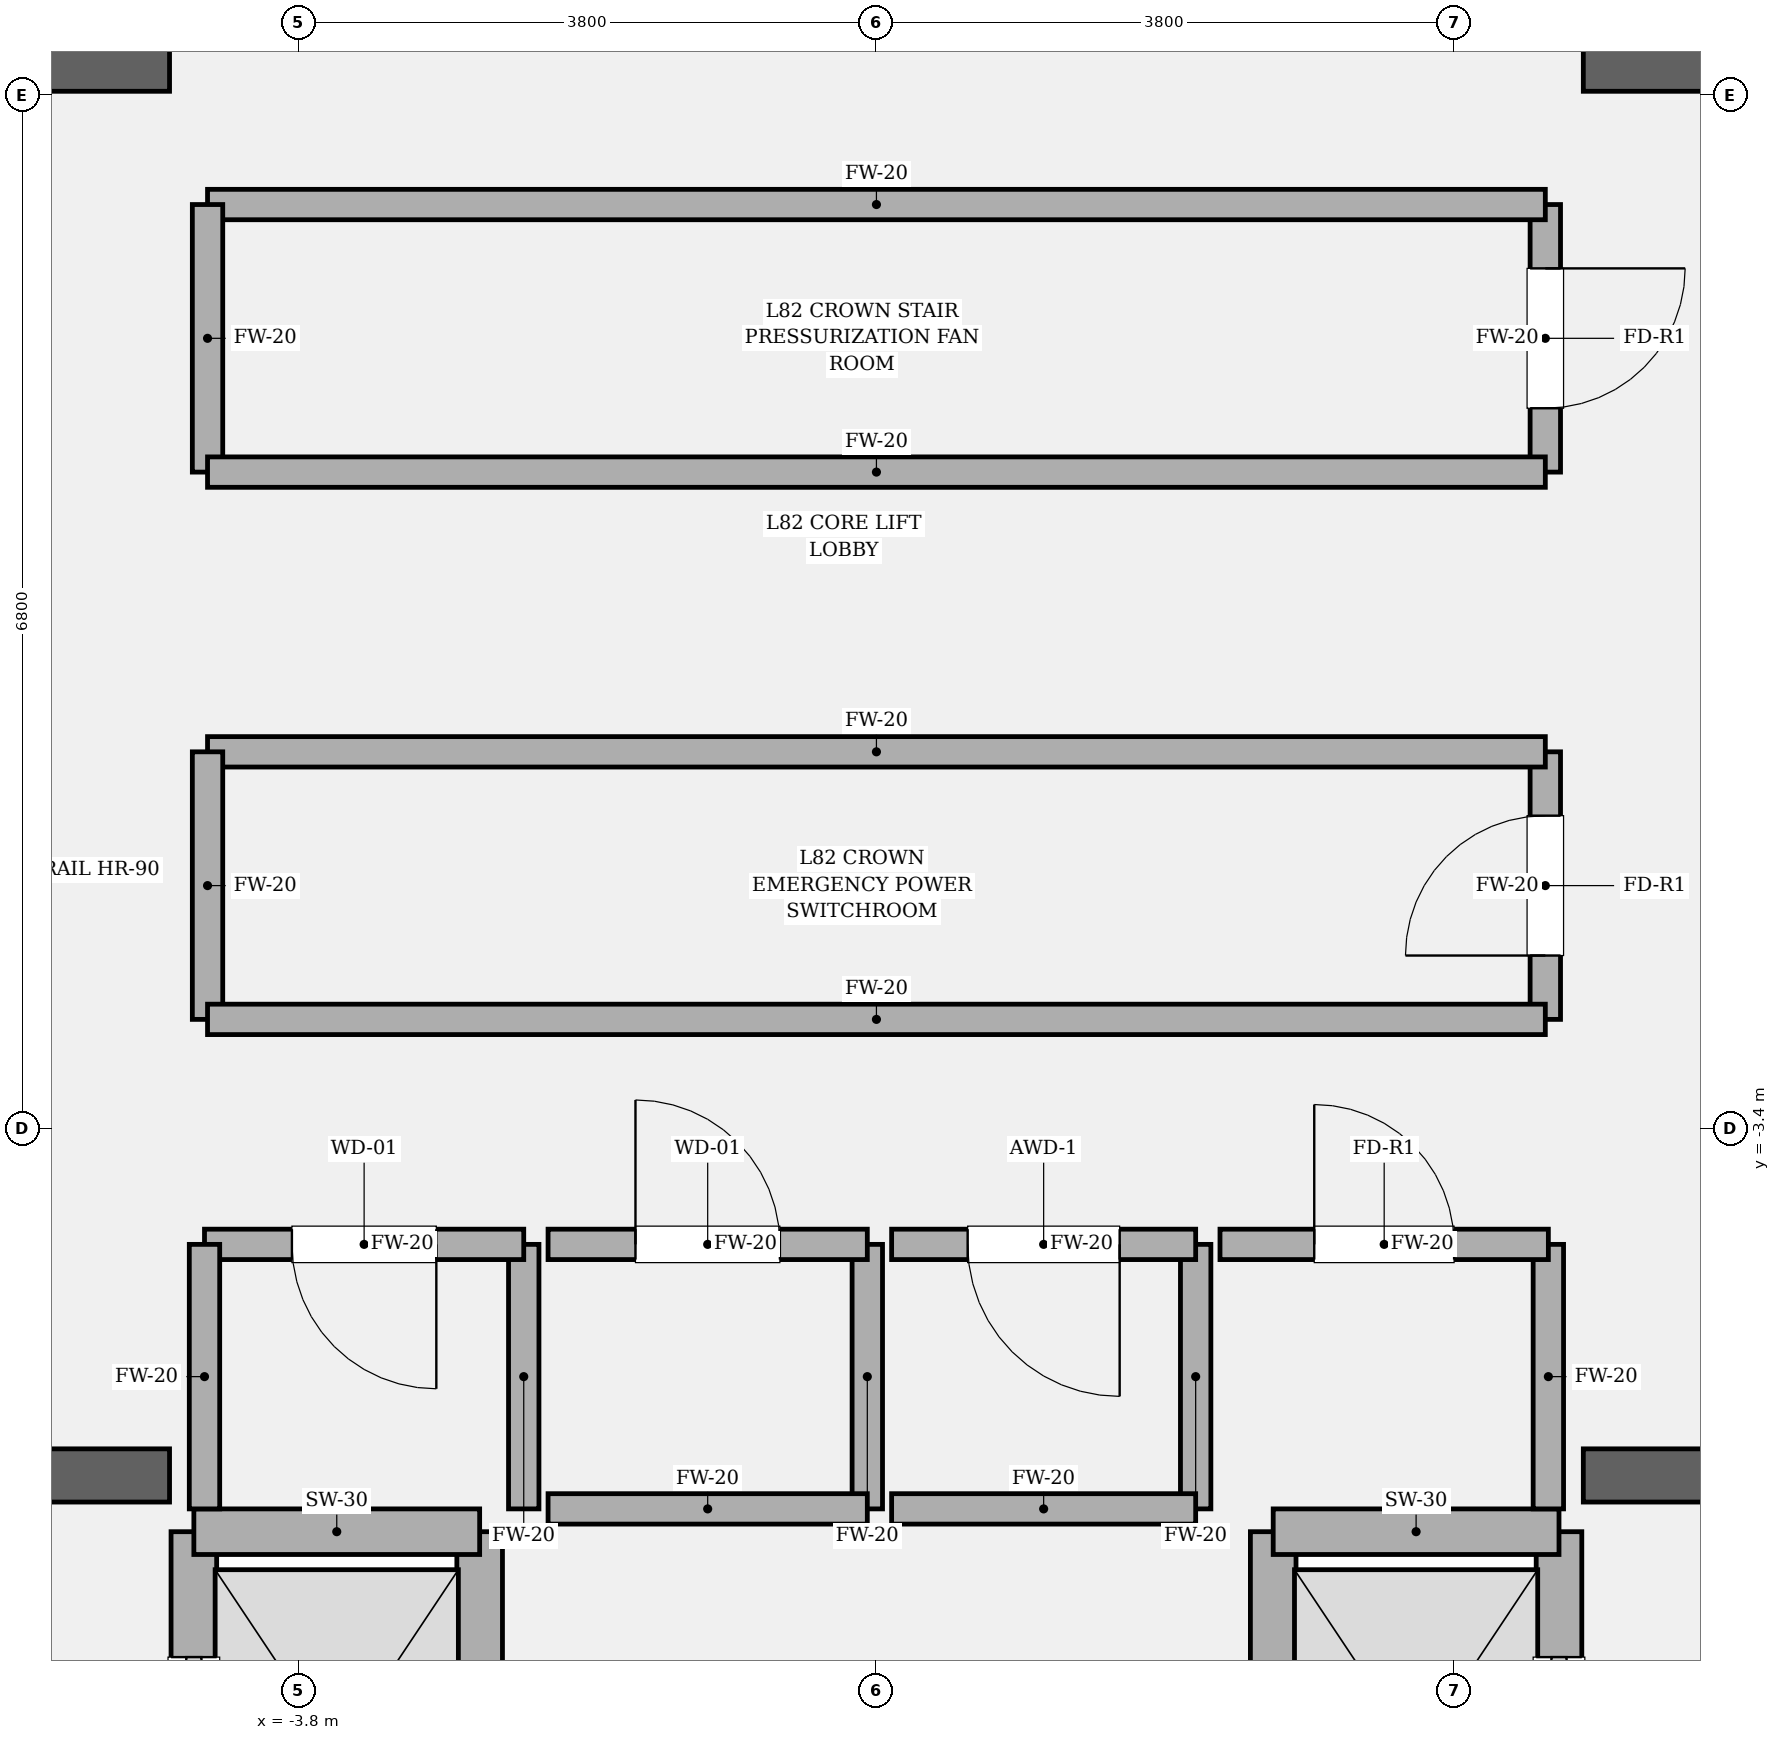
"""IFC4 building model, lengths in metres.
Left out: names, types, materials, properties, quantities, classifications, styles, units other than length and angle.
Written with IfcOpenShell. Run it as: python <this file> out.ifc"""

import sys

from ifc_helpers import new_model, si_unit, direction, frame, frame_2d, origin, place, context, subcontext, project, spatial, rectangle, extrude, element, fill, save


model = new_model("IFC4")
c1 = context("Model", 3, precision=1e-05, world=origin(), true_north=direction((0.0, 1.0)))
c2 = subcontext(c1, "Body", "Model", "MODEL_VIEW")
j1 = project(units=[si_unit("LENGTHUNIT", "METRE"), si_unit("PLANEANGLEUNIT", "RADIAN")], contexts=[c1])
p1 = place(None, origin())
s1 = spatial("IfcSite", under=j1, at=p1, CompositionType="ELEMENT")
p2 = place(p1, origin())
s2 = spatial("IfcBuilding", under=s1, at=p2, CompositionType="ELEMENT")
p3 = place(p2, frame((0.0, 0.0, 348.3)))
s3 = spatial("IfcBuildingStorey", under=s2, at=p3, CompositionType="ELEMENT", Elevation=348.3)
p4 = place(p3, frame((-9.975, -5.68, 0.0), z_axis=(0.0, 0.0, 1.0), x_axis=(1.0, 0.0, 0.0)))
e1 = element("IfcWall", 1, at=p4, inside=s3, PredefinedType="SOLIDWALL", context=c2, shape_type="SweptSolid", body=[
    extrude(rectangle(XDim=5.325, YDim=0.35, at=frame_2d((2.663, 0.0))), origin(), (0.0, 0.0, 1.0), 4.5),
])
p5 = place(p4, frame((1.435, 0.0, 0.0)))
e2 = element("IfcOpeningElement", 2, at=p5, cuts=e1, PredefinedType="OPENING", context=c2, shape_type="SweptSolid", body=[
    extrude(rectangle(XDim=1.18, YDim=2.2, at=frame_2d((0.59, 1.1))), frame((0.0, 0.185, 0.0), z_axis=(0.0, -1.0, 0.0), x_axis=(1.0, 0.0, 0.0)), (0.0, 0.0, 1.0), 0.37),
])
p6 = place(p3, frame((4.65, -5.68, 0.0), z_axis=(0.0, 0.0, 1.0), x_axis=(1.0, 0.0, 0.0)))
e3 = element("IfcWall", 3, at=p6, inside=s3, PredefinedType="SOLIDWALL", context=c2, shape_type="SweptSolid", body=[
    extrude(rectangle(XDim=5.325, YDim=0.35, at=frame_2d((2.663, 0.0))), origin(), (0.0, 0.0, 1.0), 4.5),
])
p7 = place(p6, frame((2.71, 0.0, 0.0)))
e4 = element("IfcOpeningElement", 4, at=p7, cuts=e3, PredefinedType="OPENING", context=c2, shape_type="SweptSolid", body=[
    extrude(rectangle(XDim=1.18, YDim=2.2, at=frame_2d((0.59, 1.1))), frame((0.0, 0.185, 0.0), z_axis=(0.0, -1.0, 0.0), x_axis=(1.0, 0.0, 0.0)), (0.0, 0.0, 1.0), 0.37),
])
for number, where, z_axis, x_axis in (
    (5, (-9.975, 3.6, 0.0), (0.0, 0.0, 1.0), (1.0, 0.0, 0.0)),
    (6, (4.65, 3.6, 0.0), (0.0, 0.0, 1.0), (1.0, 0.0, 0.0)),
):
    element("IfcWall", number, at=place(p3, frame(where, z_axis=z_axis, x_axis=x_axis)), inside=s3, PredefinedType="SOLIDWALL", context=c2, shape_type="SweptSolid", body=[
        extrude(rectangle(XDim=5.325, YDim=0.35, at=frame_2d((2.663, 0.0))), origin(), (0.0, 0.0, 1.0), 4.5),
    ])
p8 = place(p3, frame((-4.49, -8.82, 0.0), z_axis=(0.0, 0.0, 1.0), x_axis=(0.0, 1.0, 0.0)))
e7 = element("IfcWall", 7, at=p8, inside=s3, PredefinedType="SOLIDWALL", context=c2, shape_type="SweptSolid", body=[
    extrude(rectangle(XDim=2.77, YDim=0.3, at=frame_2d((1.385, 0.0))), origin(), (0.0, 0.0, 1.0), 4.22),
])
p9 = place(p8, frame((0.825, 0.0, 0.0)))
e8 = element("IfcOpeningElement", 8, at=p9, cuts=e7, PredefinedType="OPENING", context=c2, shape_type="SweptSolid", body=[
    extrude(rectangle(XDim=1.12, YDim=2.25, at=frame_2d((0.56, 1.125))), frame((0.0, 0.16, 0.0), z_axis=(0.0, -1.0, 0.0), x_axis=(1.0, 0.0, 0.0)), (0.0, 0.0, 1.0), 0.32),
])
p10 = place(p3, frame((-2.61, -8.82, 0.0), z_axis=(0.0, 0.0, 1.0), x_axis=(0.0, 1.0, 0.0)))
e9 = element("IfcWall", 9, at=p10, inside=s3, PredefinedType="SOLIDWALL", context=c2, shape_type="SweptSolid", body=[
    extrude(rectangle(XDim=2.77, YDim=0.3, at=frame_2d((1.385, 0.0))), origin(), (0.0, 0.0, 1.0), 4.22),
])
p11 = place(p3, frame((-4.49, -6.05, 0.0), z_axis=(0.0, 0.0, 1.0), x_axis=(1.0, 0.0, 0.0)))
e10 = element("IfcWall", 10, at=p11, inside=s3, PredefinedType="SOLIDWALL", context=c2, shape_type="SweptSolid", body=[
    extrude(rectangle(XDim=1.88, YDim=0.3, at=frame_2d((0.94, 0.0))), origin(), (0.0, 0.0, 1.0), 4.22),
])
p12 = place(p3, frame((4.49, -8.82, 0.0), z_axis=(0.0, 0.0, 1.0), x_axis=(0.0, 1.0, 0.0)))
e11 = element("IfcWall", 11, at=p12, inside=s3, PredefinedType="SOLIDWALL", context=c2, shape_type="SweptSolid", body=[
    extrude(rectangle(XDim=2.77, YDim=0.3, at=frame_2d((1.385, 0.0))), origin(), (0.0, 0.0, 1.0), 4.22),
])
p13 = place(p12, frame((0.825, 0.0, 0.0)))
e12 = element("IfcOpeningElement", 12, at=p13, cuts=e11, PredefinedType="OPENING", context=c2, shape_type="SweptSolid", body=[
    extrude(rectangle(XDim=1.12, YDim=2.25, at=frame_2d((0.56, 1.125))), frame((0.0, 0.16, 0.0), z_axis=(0.0, -1.0, 0.0), x_axis=(1.0, 0.0, 0.0)), (0.0, 0.0, 1.0), 0.32),
])
p14 = place(p3, frame((2.61, -8.82, 0.0), z_axis=(0.0, 0.0, 1.0), x_axis=(0.0, 1.0, 0.0)))
e13 = element("IfcWall", 13, at=p14, inside=s3, PredefinedType="SOLIDWALL", context=c2, shape_type="SweptSolid", body=[
    extrude(rectangle(XDim=2.77, YDim=0.3, at=frame_2d((1.385, 0.0))), origin(), (0.0, 0.0, 1.0), 4.22),
])
p15 = place(p3, frame((2.61, -6.05, 0.0), z_axis=(0.0, 0.0, 1.0), x_axis=(1.0, 0.0, 0.0)))
e14 = element("IfcWall", 14, at=p15, inside=s3, PredefinedType="SOLIDWALL", context=c2, shape_type="SweptSolid", body=[
    extrude(rectangle(XDim=1.88, YDim=0.3, at=frame_2d((0.94, 0.0))), origin(), (0.0, 0.0, 1.0), 4.22),
])
p16 = place(p3, frame((-2.32, -5.9, 0.0), z_axis=(0.0, 0.0, 1.0), x_axis=(0.0, 1.0, 0.0)))
e15 = element("IfcWall", 15, at=p16, inside=s3, PredefinedType="SOLIDWALL", context=c2, shape_type="SweptSolid", body=[
    extrude(rectangle(XDim=1.74, YDim=0.2, at=frame_2d((0.87, 0.0))), origin(), (0.0, 0.0, 1.0), 4.22),
])
p17 = place(p3, frame((-2.32, -4.16, 0.0), z_axis=(0.0, 0.0, 1.0), x_axis=(-1.0, 0.0, 0.0)))
e16 = element("IfcWall", 16, at=p17, inside=s3, PredefinedType="SOLIDWALL", context=c2, shape_type="SweptSolid", body=[
    extrude(rectangle(XDim=2.1, YDim=0.2, at=frame_2d((1.05, 0.0))), origin(), (0.0, 0.0, 1.0), 4.22),
])
p18 = place(p17, frame((0.575, 0.0, 0.0)))
e17 = element("IfcOpeningElement", 17, at=p18, cuts=e16, PredefinedType="OPENING", context=c2, shape_type="SweptSolid", body=[
    extrude(rectangle(XDim=0.95, YDim=2.15, at=frame_2d((0.475, 1.075))), frame((0.0, 0.11, 0.0), z_axis=(0.0, -1.0, 0.0), x_axis=(1.0, 0.0, 0.0)), (0.0, 0.0, 1.0), 0.22),
])
for number, where, z_axis, x_axis in (
    (18, (-4.42, -4.16, 0.0), (0.0, 0.0, 1.0), (0.0, -1.0, 0.0)),
    (19, (-0.06, -5.9, 0.0), (0.0, 0.0, 1.0), (0.0, 1.0, 0.0)),
):
    element("IfcWall", number, at=place(p3, frame(where, z_axis=z_axis, x_axis=x_axis)), inside=s3, PredefinedType="SOLIDWALL", context=c2, shape_type="SweptSolid", body=[
        extrude(rectangle(XDim=1.74, YDim=0.2, at=frame_2d((0.87, 0.0))), origin(), (0.0, 0.0, 1.0), 4.22),
    ])
p19 = place(p3, frame((-0.06, -4.16, 0.0), z_axis=(0.0, 0.0, 1.0), x_axis=(-1.0, 0.0, 0.0)))
e20 = element("IfcWall", 20, at=p19, inside=s3, PredefinedType="SOLIDWALL", context=c2, shape_type="SweptSolid", body=[
    extrude(rectangle(XDim=2.1, YDim=0.2, at=frame_2d((1.05, 0.0))), origin(), (0.0, 0.0, 1.0), 4.22),
])
p20 = place(p19, frame((0.575, 0.0, 0.0)))
e21 = element("IfcOpeningElement", 21, at=p20, cuts=e20, PredefinedType="OPENING", context=c2, shape_type="SweptSolid", body=[
    extrude(rectangle(XDim=0.95, YDim=2.15, at=frame_2d((0.475, 1.075))), frame((0.0, 0.11, 0.0), z_axis=(0.0, -1.0, 0.0), x_axis=(1.0, 0.0, 0.0)), (0.0, 0.0, 1.0), 0.22),
])
p21 = place(p3, frame((-2.16, -5.9, 0.0), z_axis=(0.0, 0.0, 1.0), x_axis=(1.0, 0.0, 0.0)))
e22 = element("IfcWall", 22, at=p21, inside=s3, PredefinedType="SOLIDWALL", context=c2, shape_type="SweptSolid", body=[
    extrude(rectangle(XDim=2.1, YDim=0.2, at=frame_2d((1.05, 0.0))), origin(), (0.0, 0.0, 1.0), 4.22),
])
p22 = place(p3, frame((2.1, -5.9, 0.0), z_axis=(0.0, 0.0, 1.0), x_axis=(0.0, 1.0, 0.0)))
e23 = element("IfcWall", 23, at=p22, inside=s3, PredefinedType="SOLIDWALL", context=c2, shape_type="SweptSolid", body=[
    extrude(rectangle(XDim=1.74, YDim=0.2, at=frame_2d((0.87, 0.0))), origin(), (0.0, 0.0, 1.0), 4.22),
])
p23 = place(p3, frame((2.1, -4.16, 0.0), z_axis=(0.0, 0.0, 1.0), x_axis=(-1.0, 0.0, 0.0)))
e24 = element("IfcWall", 24, at=p23, inside=s3, PredefinedType="SOLIDWALL", context=c2, shape_type="SweptSolid", body=[
    extrude(rectangle(XDim=2.0, YDim=0.2, at=frame_2d((1.0, 0.0))), origin(), (0.0, 0.0, 1.0), 4.22),
])
p24 = place(p23, frame((0.5, 0.0, 0.0)))
e25 = element("IfcOpeningElement", 25, at=p24, cuts=e24, PredefinedType="OPENING", context=c2, shape_type="SweptSolid", body=[
    extrude(rectangle(XDim=1.0, YDim=2.15, at=frame_2d((0.5, 1.075))), frame((0.0, 0.11, 0.0), z_axis=(0.0, -1.0, 0.0), x_axis=(1.0, 0.0, 0.0)), (0.0, 0.0, 1.0), 0.22),
])
p25 = place(p3, frame((0.1, -5.9, 0.0), z_axis=(0.0, 0.0, 1.0), x_axis=(1.0, 0.0, 0.0)))
e26 = element("IfcWall", 26, at=p25, inside=s3, PredefinedType="SOLIDWALL", context=c2, shape_type="SweptSolid", body=[
    extrude(rectangle(XDim=2.0, YDim=0.2, at=frame_2d((1.0, 0.0))), origin(), (0.0, 0.0, 1.0), 4.22),
])
p26 = place(p3, frame((4.42, -5.9, 0.0), z_axis=(0.0, 0.0, 1.0), x_axis=(0.0, 1.0, 0.0)))
e27 = element("IfcWall", 27, at=p26, inside=s3, PredefinedType="SOLIDWALL", context=c2, shape_type="SweptSolid", body=[
    extrude(rectangle(XDim=1.74, YDim=0.2, at=frame_2d((0.87, 0.0))), origin(), (0.0, 0.0, 1.0), 4.22),
])
p27 = place(p3, frame((4.42, -4.16, 0.0), z_axis=(0.0, 0.0, 1.0), x_axis=(-1.0, 0.0, 0.0)))
e28 = element("IfcWall", 28, at=p27, inside=s3, PredefinedType="SOLIDWALL", context=c2, shape_type="SweptSolid", body=[
    extrude(rectangle(XDim=2.16, YDim=0.2, at=frame_2d((1.08, 0.0))), origin(), (0.0, 0.0, 1.0), 4.22),
])
p28 = place(p27, frame((0.62, 0.0, 0.0)))
e29 = element("IfcOpeningElement", 29, at=p28, cuts=e28, PredefinedType="OPENING", context=c2, shape_type="SweptSolid", body=[
    extrude(rectangle(XDim=0.92, YDim=2.1, at=frame_2d((0.46, 1.05))), frame((0.0, 0.11, 0.0), z_axis=(0.0, -1.0, 0.0), x_axis=(1.0, 0.0, 0.0)), (0.0, 0.0, 1.0), 0.22),
])
p29 = place(p3, frame((4.4, -2.68, 0.0), z_axis=(0.0, 0.0, 1.0), x_axis=(0.0, 1.0, 0.0)))
e30 = element("IfcWall", 30, at=p29, inside=s3, PredefinedType="SOLIDWALL", context=c2, shape_type="SweptSolid", body=[
    extrude(rectangle(XDim=1.76, YDim=0.2, at=frame_2d((0.88, 0.0))), origin(), (0.0, 0.0, 1.0), 4.22),
])
p30 = place(p29, frame((0.42, 0.0, 0.0)))
e31 = element("IfcOpeningElement", 31, at=p30, cuts=e30, PredefinedType="OPENING", context=c2, shape_type="SweptSolid", body=[
    extrude(rectangle(XDim=0.92, YDim=2.1, at=frame_2d((0.46, 1.05))), frame((0.0, 0.11, 0.0), z_axis=(0.0, -1.0, 0.0), x_axis=(1.0, 0.0, 0.0)), (0.0, 0.0, 1.0), 0.22),
])
p31 = place(p3, frame((4.4, -0.92, 0.0), z_axis=(0.0, 0.0, 1.0), x_axis=(-1.0, 0.0, 0.0)))
e32 = element("IfcWall", 32, at=p31, inside=s3, PredefinedType="SOLIDWALL", context=c2, shape_type="SweptSolid", body=[
    extrude(rectangle(XDim=8.8, YDim=0.2, at=frame_2d((4.4, 0.0))), origin(), (0.0, 0.0, 1.0), 4.22),
])
p32 = place(p3, frame((-4.4, -0.92, 0.0), z_axis=(0.0, 0.0, 1.0), x_axis=(0.0, -1.0, 0.0)))
e33 = element("IfcWall", 33, at=p32, inside=s3, PredefinedType="SOLIDWALL", context=c2, shape_type="SweptSolid", body=[
    extrude(rectangle(XDim=1.76, YDim=0.2, at=frame_2d((0.88, 0.0))), origin(), (0.0, 0.0, 1.0), 4.22),
])
p33 = place(p3, frame((-4.4, -2.68, 0.0), z_axis=(0.0, 0.0, 1.0), x_axis=(1.0, 0.0, 0.0)))
e34 = element("IfcWall", 34, at=p33, inside=s3, PredefinedType="SOLIDWALL", context=c2, shape_type="SweptSolid", body=[
    extrude(rectangle(XDim=8.8, YDim=0.2, at=frame_2d((4.4, 0.0))), origin(), (0.0, 0.0, 1.0), 4.22),
])
p34 = place(p3, frame((4.4, 0.92, 0.0), z_axis=(0.0, 0.0, 1.0), x_axis=(0.0, 1.0, 0.0)))
e35 = element("IfcWall", 35, at=p34, inside=s3, PredefinedType="SOLIDWALL", context=c2, shape_type="SweptSolid", body=[
    extrude(rectangle(XDim=1.76, YDim=0.2, at=frame_2d((0.88, 0.0))), origin(), (0.0, 0.0, 1.0), 4.22),
])
p35 = place(p34, frame((0.42, 0.0, 0.0)))
e36 = element("IfcOpeningElement", 36, at=p35, cuts=e35, PredefinedType="OPENING", context=c2, shape_type="SweptSolid", body=[
    extrude(rectangle(XDim=0.92, YDim=2.1, at=frame_2d((0.46, 1.05))), frame((0.0, 0.11, 0.0), z_axis=(0.0, -1.0, 0.0), x_axis=(1.0, 0.0, 0.0)), (0.0, 0.0, 1.0), 0.22),
])
p36 = place(p3, frame((4.4, 2.68, 0.0), z_axis=(0.0, 0.0, 1.0), x_axis=(-1.0, 0.0, 0.0)))
e37 = element("IfcWall", 37, at=p36, inside=s3, PredefinedType="SOLIDWALL", context=c2, shape_type="SweptSolid", body=[
    extrude(rectangle(XDim=8.8, YDim=0.2, at=frame_2d((4.4, 0.0))), origin(), (0.0, 0.0, 1.0), 4.22),
])
p37 = place(p3, frame((-4.4, 2.68, 0.0), z_axis=(0.0, 0.0, 1.0), x_axis=(0.0, -1.0, 0.0)))
e38 = element("IfcWall", 38, at=p37, inside=s3, PredefinedType="SOLIDWALL", context=c2, shape_type="SweptSolid", body=[
    extrude(rectangle(XDim=1.76, YDim=0.2, at=frame_2d((0.88, 0.0))), origin(), (0.0, 0.0, 1.0), 4.22),
])
p38 = place(p3, frame((-4.4, 0.92, 0.0), z_axis=(0.0, 0.0, 1.0), x_axis=(1.0, 0.0, 0.0)))
e39 = element("IfcWall", 39, at=p38, inside=s3, PredefinedType="SOLIDWALL", context=c2, shape_type="SweptSolid", body=[
    extrude(rectangle(XDim=8.8, YDim=0.2, at=frame_2d((4.4, 0.0))), origin(), (0.0, 0.0, 1.0), 4.22),
])
p39 = place(p9, origin())
e40 = element("IfcDoor", 40, at=p39, inside=s3, OperationType="SLIDING_TO_LEFT", PredefinedType="DOOR", context=c2, shape_type="SweptSolid", body=[
    extrude(rectangle(XDim=1.12, YDim=2.25, at=frame_2d((0.56, 1.125))), frame((0.0, 0.025, 0.0), z_axis=(0.0, -1.0, 0.0), x_axis=(1.0, 0.0, 0.0)), (0.0, 0.0, 1.0), 0.05),
])
fill(e8, e40)
p40 = place(p13, origin())
e41 = element("IfcDoor", 41, at=p40, inside=s3, OperationType="SLIDING_TO_RIGHT", PredefinedType="DOOR", context=c2, shape_type="SweptSolid", body=[
    extrude(rectangle(XDim=1.12, YDim=2.25, at=frame_2d((0.56, 1.125))), frame((0.0, 0.025, 0.0), z_axis=(0.0, -1.0, 0.0), x_axis=(1.0, 0.0, 0.0)), (0.0, 0.0, 1.0), 0.05),
])
fill(e12, e41)
p41 = place(p18, origin())
e42 = element("IfcDoor", 42, at=p41, inside=s3, OperationType="SINGLE_SWING_LEFT", PredefinedType="DOOR", context=c2, shape_type="SweptSolid", body=[
    extrude(rectangle(XDim=0.95, YDim=2.15, at=frame_2d((0.475, 1.075))), frame((0.0, 0.025, 0.0), z_axis=(0.0, -1.0, 0.0), x_axis=(1.0, 0.0, 0.0)), (0.0, 0.0, 1.0), 0.05),
])
fill(e17, e42)
p42 = place(p20, origin())
e43 = element("IfcDoor", 43, at=p42, inside=s3, OperationType="SINGLE_SWING_RIGHT", PredefinedType="DOOR", context=c2, shape_type="SweptSolid", body=[
    extrude(rectangle(XDim=0.95, YDim=2.15, at=frame_2d((0.475, 1.075))), frame((0.0, 0.025, 0.0), z_axis=(0.0, -1.0, 0.0), x_axis=(1.0, 0.0, 0.0)), (0.0, 0.0, 1.0), 0.05),
])
fill(e21, e43)
p43 = place(p24, origin())
e44 = element("IfcDoor", 44, at=p43, inside=s3, OperationType="SINGLE_SWING_LEFT", PredefinedType="DOOR", context=c2, shape_type="SweptSolid", body=[
    extrude(rectangle(XDim=1.0, YDim=2.15, at=frame_2d((0.5, 1.075))), frame((0.0, 0.025, 0.0), z_axis=(0.0, -1.0, 0.0), x_axis=(1.0, 0.0, 0.0)), (0.0, 0.0, 1.0), 0.05),
])
fill(e25, e44)
p44 = place(p28, origin())
e45 = element("IfcDoor", 45, at=p44, inside=s3, OperationType="SINGLE_SWING_RIGHT", PredefinedType="DOOR", context=c2, shape_type="SweptSolid", body=[
    extrude(rectangle(XDim=0.92, YDim=2.1, at=frame_2d((0.46, 1.05))), frame((0.0, 0.025, 0.0), z_axis=(0.0, -1.0, 0.0), x_axis=(1.0, 0.0, 0.0)), (0.0, 0.0, 1.0), 0.05),
])
fill(e29, e45)
p45 = place(p30, origin())
e46 = element("IfcDoor", 46, at=p45, inside=s3, OperationType="SINGLE_SWING_LEFT", PredefinedType="DOOR", context=c2, shape_type="SweptSolid", body=[
    extrude(rectangle(XDim=0.92, YDim=2.1, at=frame_2d((0.46, 1.05))), frame((0.0, 0.025, 0.0), z_axis=(0.0, -1.0, 0.0), x_axis=(1.0, 0.0, 0.0)), (0.0, 0.0, 1.0), 0.05),
])
fill(e31, e46)
p46 = place(p35, origin())
e47 = element("IfcDoor", 47, at=p46, inside=s3, OperationType="SINGLE_SWING_RIGHT", PredefinedType="DOOR", context=c2, shape_type="SweptSolid", body=[
    extrude(rectangle(XDim=0.92, YDim=2.1, at=frame_2d((0.46, 1.05))), frame((0.0, 0.025, 0.0), z_axis=(0.0, -1.0, 0.0), x_axis=(1.0, 0.0, 0.0)), (0.0, 0.0, 1.0), 0.05),
])
fill(e36, e47)
save(model, sys.argv[1])
